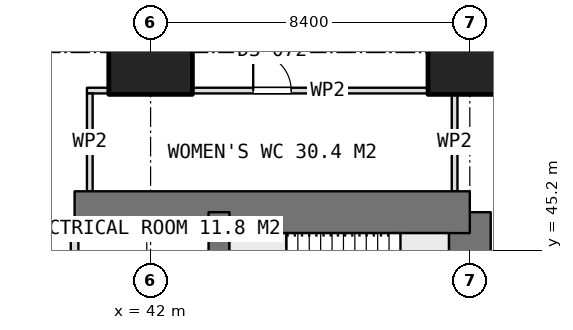
"""IFC4 building model, lengths in metres.
Left out: names, types, materials, properties, quantities, classifications, styles, units other than length and angle.
Written with IfcOpenShell. Run it as: python <this file> out.ifc"""

import sys

from ifc_helpers import new_model, si_unit, direction, frame, frame_2d, origin, origin_2d, place, context, subcontext, project, spatial, rectangle, extrude, element, fill, save


model = new_model("IFC4")
c1 = context("Model", 3, precision=1e-05, world=origin(), true_north=direction((0.0, 1.0)))
c2 = subcontext(c1, "Body", "Model", "MODEL_VIEW")
j1 = project(units=[si_unit("LENGTHUNIT", "METRE"), si_unit("PLANEANGLEUNIT", "RADIAN")], contexts=[c1])
p1 = place(None, origin())
s1 = spatial("IfcSite", under=j1, at=p1, CompositionType="ELEMENT")
p2 = place(p1, origin())
s2 = spatial("IfcBuilding", under=s1, at=p2, CompositionType="ELEMENT")
p3 = place(p2, frame((0.0, 0.0, 62.9)))
s3 = spatial("IfcBuildingStorey", under=s2, at=p3, CompositionType="ELEMENT", Elevation=62.9)
p4 = place(p3, frame((40.0, 46.2, 0.0), z_axis=(0.0, 0.0, 1.0), x_axis=(1.0, 0.0, 0.0)))
e1 = element("IfcWall", 1, at=p4, inside=s3, PredefinedType="SHEAR", context=c2, shape_type="SweptSolid", body=[
    extrude(rectangle(XDim=10.4, YDim=1.1, at=frame_2d((5.2, 0.0))), origin(), (0.0, 0.0, 1.0), 3.75),
])
p5 = place(p3, frame((50.4, 21.0, 0.0), z_axis=(0.0, 0.0, 1.0), x_axis=(0.0, 1.0, 0.0)))
e2 = element("IfcWall", 2, at=p5, inside=s3, PredefinedType="SHEAR", context=c2, shape_type="SweptSolid", body=[
    extrude(rectangle(XDim=25.2, YDim=1.1, at=frame_2d((12.6, 0.0))), origin(), (0.0, 0.0, 1.0), 3.75),
])
p6 = place(p5, frame((16.2, 0.0, 0.0)))
e3 = element("IfcOpeningElement", 3, at=p6, cuts=e2, PredefinedType="OPENING", context=c2, shape_type="SweptSolid", body=[
    extrude(rectangle(XDim=1.2, YDim=2.1, at=frame_2d((0.6, 1.05))), frame((0.0, 0.56, 0.0), z_axis=(0.0, -1.0, 0.0), x_axis=(1.0, 0.0, 0.0)), (0.0, 0.0, 1.0), 1.12),
])
p7 = place(p5, frame((10.05, 0.0, 0.0)))
e4 = element("IfcOpeningElement", 4, at=p7, cuts=e2, PredefinedType="OPENING", context=c2, shape_type="SweptSolid", body=[
    extrude(rectangle(XDim=0.9, YDim=2.1, at=frame_2d((0.45, 1.05))), frame((0.0, 0.56, 0.0), z_axis=(0.0, -1.0, 0.0), x_axis=(1.0, 0.0, 0.0)), (0.0, 0.0, 1.0), 1.12),
])
p8 = place(p5, frame((7.45, 0.0, 0.0)))
e5 = element("IfcOpeningElement", 5, at=p8, cuts=e2, PredefinedType="OPENING", context=c2, shape_type="SweptSolid", body=[
    extrude(rectangle(XDim=0.9, YDim=2.1, at=frame_2d((0.45, 1.05))), frame((0.0, 0.56, 0.0), z_axis=(0.0, -1.0, 0.0), x_axis=(1.0, 0.0, 0.0)), (0.0, 0.0, 1.0), 1.12),
])
p9 = place(p5, frame((0.75, 0.0, 0.0)))
e6 = element("IfcOpeningElement", 6, at=p9, cuts=e2, PredefinedType="OPENING", context=c2, shape_type="SweptSolid", body=[
    extrude(rectangle(XDim=1.2, YDim=2.1, at=frame_2d((0.6, 1.05))), frame((0.0, 0.56, 0.0), z_axis=(0.0, -1.0, 0.0), x_axis=(1.0, 0.0, 0.0)), (0.0, 0.0, 1.0), 1.12),
])
p10 = place(p3, frame((43.8, 21.0, 0.0), z_axis=(0.0, 0.0, 1.0), x_axis=(0.0, 1.0, 0.0)))
e7 = element("IfcWall", 7, at=p10, inside=s3, PredefinedType="SHEAR", context=c2, shape_type="SweptSolid", body=[
    extrude(rectangle(XDim=25.2, YDim=0.55, at=frame_2d((12.6, 0.0))), origin(), (0.0, 0.0, 1.0), 3.75),
])
for number, where, z_axis, x_axis in (
    (8, (42.0, 50.4, 0.0), (0.0, 0.0, 1.0), (1.0, 0.0, 0.0)),
    (9, (50.4, 50.4, 0.0), (0.0, 0.0, 1.0), (1.0, 0.0, 0.0)),
):
    element("IfcColumn", number, at=place(p3, frame(where, z_axis=z_axis, x_axis=x_axis)), inside=s3, PredefinedType="COLUMN", context=c2, shape_type="SweptSolid", body=[
        extrude(rectangle(XDim=2.2, YDim=2.2, at=origin_2d()), origin(), (0.0, 0.0, 1.0), 3.75),
    ])
p11 = place(p3, frame((40.0, 41.675, 0.0), z_axis=(0.0, 0.0, 1.0), x_axis=(0.0, 1.0, 0.0)))
e10 = element("IfcWall", 10, at=p11, inside=s3, PredefinedType="PARTITIONING", context=c2, shape_type="SweptSolid", body=[
    extrude(rectangle(XDim=3.975, YDim=0.2, at=frame_2d((1.987, 0.0))), origin(), (0.0, 0.0, 1.0), 3.5),
])
p12 = place(p11, frame((2.525, 0.0, 0.0)))
e11 = element("IfcOpeningElement", 11, at=p12, cuts=e10, PredefinedType="OPENING", context=c2, shape_type="SweptSolid", body=[
    extrude(rectangle(XDim=0.9, YDim=2.1, at=frame_2d((0.45, 1.05))), frame((0.0, 0.11, 0.0), z_axis=(0.0, -1.0, 0.0), x_axis=(1.0, 0.0, 0.0)), (0.0, 0.0, 1.0), 0.22),
])
p13 = place(p11, frame((0.125, 0.0, 0.0)))
e12 = element("IfcOpeningElement", 12, at=p13, cuts=e10, PredefinedType="OPENING", context=c2, shape_type="SweptSolid", body=[
    extrude(rectangle(XDim=0.9, YDim=2.1, at=frame_2d((0.45, 1.05))), frame((0.0, 0.11, 0.0), z_axis=(0.0, -1.0, 0.0), x_axis=(1.0, 0.0, 0.0)), (0.0, 0.0, 1.0), 0.22),
])
p14 = place(p3, frame((40.325, 49.4, 0.0), z_axis=(0.0, 0.0, 1.0), x_axis=(1.0, 0.0, 0.0)))
e13 = element("IfcWall", 13, at=p14, inside=s3, PredefinedType="PARTITIONING", context=c2, shape_type="SweptSolid", body=[
    extrude(rectangle(XDim=9.75, YDim=0.15, at=frame_2d((4.875, 0.0))), origin(), (0.0, 0.0, 1.0), 3.5),
])
p15 = place(p14, frame((4.375, 0.0, 0.0)))
e14 = element("IfcOpeningElement", 14, at=p15, cuts=e13, PredefinedType="OPENING", context=c2, shape_type="SweptSolid", body=[
    extrude(rectangle(XDim=1.0, YDim=2.1, at=frame_2d((0.5, 1.05))), frame((0.0, 0.085, 0.0), z_axis=(0.0, -1.0, 0.0), x_axis=(1.0, 0.0, 0.0)), (0.0, 0.0, 1.0), 0.17),
])
for number, where, z_axis, x_axis in (
    (15, (40.4, 46.75, 0.0), (0.0, 0.0, 1.0), (0.0, 1.0, 0.0)),
    (16, (50.0, 46.75, 0.0), (0.0, 0.0, 1.0), (0.0, 1.0, 0.0)),
):
    element("IfcWall", number, at=place(p3, frame(where, z_axis=z_axis, x_axis=x_axis)), inside=s3, PredefinedType="PARTITIONING", context=c2, shape_type="SweptSolid", body=[
        extrude(rectangle(XDim=2.575, YDim=0.15, at=frame_2d((1.288, 0.0))), origin(), (0.0, 0.0, 1.0), 3.5),
    ])
p16 = place(p15, origin())
e17 = element("IfcDoor", 17, at=p16, inside=s3, OperationType="SINGLE_SWING_LEFT", PredefinedType="DOOR", context=c2, shape_type="SweptSolid", body=[
    extrude(rectangle(XDim=1.0, YDim=2.1, at=frame_2d((0.5, 1.05))), frame((0.0, 0.025, 0.0), z_axis=(0.0, -1.0, 0.0), x_axis=(1.0, 0.0, 0.0)), (0.0, 0.0, 1.0), 0.05),
])
fill(e14, e17)
save(model, sys.argv[1])
